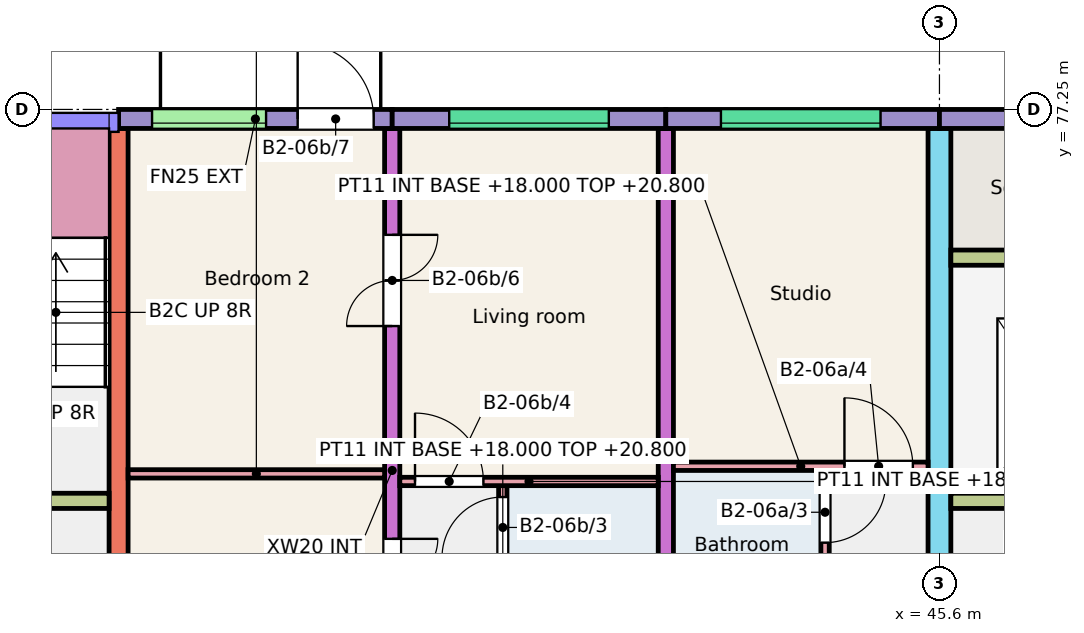
"""IFC4 building model, lengths in metres.
Left out: names, types, materials, properties, quantities, classifications, styles, units other than length and angle.
Written with IfcOpenShell. Run it as: python <this file> out.ifc"""

import sys

from ifc_helpers import new_model, si_unit, direction, frame, frame_2d, origin, place, context, subcontext, project, spatial, rectangle, extrude, element, fill, save


model = new_model("IFC4")
c1 = context("Model", 3, precision=1e-05, world=origin(), true_north=direction((0.0, 1.0)))
c2 = subcontext(c1, "Body", "Model", "MODEL_VIEW")
j1 = project(units=[si_unit("LENGTHUNIT", "METRE"), si_unit("PLANEANGLEUNIT", "RADIAN")], contexts=[c1])
p1 = place(None, origin())
s1 = spatial("IfcSite", under=j1, at=p1, CompositionType="ELEMENT")
p2 = place(p1, origin())
s2 = spatial("IfcBuilding", under=s1, at=p2, CompositionType="ELEMENT")
p3 = place(p2, frame((0.0, 0.0, 18.0)))
s3 = spatial("IfcBuildingStorey", under=s2, at=p3, CompositionType="ELEMENT", Elevation=18.0)
p4 = place(p3, frame((34.8, 68.0, 0.0), z_axis=(0.0, 0.0, 1.0), x_axis=(0.0, 1.0, 0.0)))
e1 = element("IfcWall", 1, at=p4, inside=s3, PredefinedType="SHEAR", context=c2, shape_type="SweptSolid", body=[
    extrude(rectangle(XDim=9.0, YDim=0.25, at=frame_2d((4.5, 0.0))), origin(), (0.0, 0.0, 1.0), 3.0),
])
p5 = place(p3, frame((38.4, 68.0, 0.0), z_axis=(0.0, 0.0, 1.0), x_axis=(0.0, 1.0, 0.0)))
e2 = element("IfcWall", 2, at=p5, inside=s3, PredefinedType="SHEAR", context=c2, shape_type="SweptSolid", body=[
    extrude(rectangle(XDim=9.0, YDim=0.2, at=frame_2d((4.5, 0.0))), origin(), (0.0, 0.0, 1.0), 3.0),
])
p6 = place(p5, frame((2.4, 0.0, 0.0)))
e3 = element("IfcOpeningElement", 3, at=p6, cuts=e2, PredefinedType="OPENING", context=c2, shape_type="SweptSolid", body=[
    extrude(rectangle(XDim=1.2, YDim=2.1, at=frame_2d((0.6, 1.05))), frame((0.0, 0.11, 0.0), z_axis=(0.0, -1.0, 0.0), x_axis=(1.0, 0.0, 0.0)), (0.0, 0.0, 1.0), 0.22),
])
p7 = place(p5, frame((6.4, 0.0, 0.0)))
e4 = element("IfcOpeningElement", 4, at=p7, cuts=e2, PredefinedType="OPENING", context=c2, shape_type="SweptSolid", body=[
    extrude(rectangle(XDim=1.2, YDim=2.1, at=frame_2d((0.6, 1.05))), frame((0.0, 0.11, 0.0), z_axis=(0.0, -1.0, 0.0), x_axis=(1.0, 0.0, 0.0)), (0.0, 0.0, 1.0), 0.22),
])
p8 = place(p3, frame((42.0, 68.0, 0.0), z_axis=(0.0, 0.0, 1.0), x_axis=(0.0, 1.0, 0.0)))
e5 = element("IfcWall", 5, at=p8, inside=s3, PredefinedType="SHEAR", context=c2, shape_type="SweptSolid", body=[
    extrude(rectangle(XDim=9.0, YDim=0.2, at=frame_2d((4.5, 0.0))), origin(), (0.0, 0.0, 1.0), 3.0),
])
p9 = place(p3, frame((45.6, 66.0, 0.0), z_axis=(0.0, 0.0, 1.0), x_axis=(0.0, 1.0, 0.0)))
e6 = element("IfcWall", 6, at=p9, inside=s3, PredefinedType="SHEAR", context=c2, shape_type="SweptSolid", body=[
    extrude(rectangle(XDim=11.0, YDim=0.3, at=frame_2d((5.5, 0.0))), origin(), (0.0, 0.0, 1.0), 3.0),
])
p10 = place(p9, frame((0.3, 0.0, 0.0)))
e7 = element("IfcOpeningElement", 7, at=p10, cuts=e6, PredefinedType="OPENING", context=c2, shape_type="SweptSolid", body=[
    extrude(rectangle(XDim=1.2, YDim=2.1, at=frame_2d((0.6, 1.05))), frame((0.0, 0.16, 0.0), z_axis=(0.0, -1.0, 0.0), x_axis=(1.0, 0.0, 0.0)), (0.0, 0.0, 1.0), 0.32),
])
p11 = place(p3, frame((28.95, 72.1, 0.0), z_axis=(0.0, 0.0, 1.0), x_axis=(1.0, 0.0, 0.0)))
e8 = element("IfcWall", 8, at=p11, inside=s3, PredefinedType="SHEAR", context=c2, shape_type="SweptSolid", body=[
    extrude(rectangle(XDim=5.725, YDim=0.2, at=frame_2d((2.863, 0.0))), origin(), (0.0, 0.0, 1.0), 3.0),
])
p12 = place(p11, frame((3.775, 0.0, 0.0)))
e9 = element("IfcOpeningElement", 9, at=p12, cuts=e8, PredefinedType="OPENING", context=c2, shape_type="SweptSolid", body=[
    extrude(rectangle(XDim=1.0, YDim=2.1, at=frame_2d((0.5, 1.05))), frame((0.0, 0.11, 0.0), z_axis=(0.0, -1.0, 0.0), x_axis=(1.0, 0.0, 0.0)), (0.0, 0.0, 1.0), 0.22),
])
p13 = place(p11, frame((0.762, 0.0, 0.0)))
e10 = element("IfcOpeningElement", 10, at=p13, cuts=e8, PredefinedType="OPENING", context=c2, shape_type="SweptSolid", body=[
    extrude(rectangle(XDim=1.1, YDim=2.1, at=frame_2d((0.55, 1.05))), frame((0.0, 0.11, 0.0), z_axis=(0.0, -1.0, 0.0), x_axis=(1.0, 0.0, 0.0)), (0.0, 0.0, 1.0), 0.22),
])
p14 = place(p3, frame((34.8, 77.125, 0.0), z_axis=(0.0, 0.0, 1.0), x_axis=(1.0, 0.0, 0.0)))
e11 = element("IfcWall", 11, at=p14, inside=s3, PredefinedType="SOLIDWALL", context=c2, shape_type="SweptSolid", body=[
    extrude(rectangle(XDim=3.6, YDim=0.25, at=frame_2d((1.8, 0.0))), origin(), (0.0, 0.0, 1.0), 3.0),
])
p15 = place(p14, frame((0.44, 0.0, 1.2)))
e12 = element("IfcOpeningElement", 12, at=p15, cuts=e11, PredefinedType="OPENING", context=c2, shape_type="SweptSolid", body=[
    extrude(rectangle(XDim=1.5, YDim=1.2, at=frame_2d((0.75, 0.6))), frame((0.0, 0.135, 0.0), z_axis=(0.0, -1.0, 0.0), x_axis=(1.0, 0.0, 0.0)), (0.0, 0.0, 1.0), 0.27),
])
p16 = place(p14, frame((2.356, 0.0, 0.0)))
e13 = element("IfcOpeningElement", 13, at=p16, cuts=e11, PredefinedType="OPENING", context=c2, shape_type="SweptSolid", body=[
    extrude(rectangle(XDim=1.0, YDim=2.1, at=frame_2d((0.5, 1.05))), frame((0.0, 0.135, 0.0), z_axis=(0.0, -1.0, 0.0), x_axis=(1.0, 0.0, 0.0)), (0.0, 0.0, 1.0), 0.27),
])
p17 = place(p3, frame((38.4, 77.125, 0.0), z_axis=(0.0, 0.0, 1.0), x_axis=(1.0, 0.0, 0.0)))
e14 = element("IfcWall", 14, at=p17, inside=s3, PredefinedType="SOLIDWALL", context=c2, shape_type="SweptSolid", body=[
    extrude(rectangle(XDim=3.6, YDim=0.25, at=frame_2d((1.8, 0.0))), origin(), (0.0, 0.0, 1.0), 3.0),
])
p18 = place(p17, frame((0.75, 0.0, 1.2)))
e15 = element("IfcOpeningElement", 15, at=p18, cuts=e14, PredefinedType="OPENING", context=c2, shape_type="SweptSolid", body=[
    extrude(rectangle(XDim=2.1, YDim=1.2, at=frame_2d((1.05, 0.6))), frame((0.0, 0.135, 0.0), z_axis=(0.0, -1.0, 0.0), x_axis=(1.0, 0.0, 0.0)), (0.0, 0.0, 1.0), 0.27),
])
p19 = place(p3, frame((42.0, 77.125, 0.0), z_axis=(0.0, 0.0, 1.0), x_axis=(1.0, 0.0, 0.0)))
e16 = element("IfcWall", 16, at=p19, inside=s3, PredefinedType="SOLIDWALL", context=c2, shape_type="SweptSolid", body=[
    extrude(rectangle(XDim=3.6, YDim=0.25, at=frame_2d((1.8, 0.0))), origin(), (0.0, 0.0, 1.0), 3.0),
])
p20 = place(p19, frame((0.725, 0.0, 1.2)))
e17 = element("IfcOpeningElement", 17, at=p20, cuts=e16, PredefinedType="OPENING", context=c2, shape_type="SweptSolid", body=[
    extrude(rectangle(XDim=2.1, YDim=1.2, at=frame_2d((1.05, 0.6))), frame((0.0, 0.135, 0.0), z_axis=(0.0, -1.0, 0.0), x_axis=(1.0, 0.0, 0.0)), (0.0, 0.0, 1.0), 0.27),
])
p21 = place(p3, frame((45.6, 77.125, 0.0), z_axis=(0.0, 0.0, 1.0), x_axis=(1.0, 0.0, 0.0)))
e18 = element("IfcWall", 18, at=p21, inside=s3, PredefinedType="SOLIDWALL", context=c2, shape_type="SweptSolid", body=[
    extrude(rectangle(XDim=2.975, YDim=0.25, at=frame_2d((1.487, 0.0))), origin(), (0.0, 0.0, 1.0), 3.0),
])
p22 = place(p3, frame((45.75, 72.1, 0.0), z_axis=(0.0, 0.0, 1.0), x_axis=(1.0, 0.0, 0.0)))
e19 = element("IfcWall", 19, at=p22, inside=s3, PredefinedType="SHEAR", context=c2, shape_type="SweptSolid", body=[
    extrude(rectangle(XDim=5.725, YDim=0.2, at=frame_2d((2.863, 0.0))), origin(), (0.0, 0.0, 1.0), 3.0),
])
p23 = place(p22, frame((3.775, 0.0, 0.0)))
e20 = element("IfcOpeningElement", 20, at=p23, cuts=e19, PredefinedType="OPENING", context=c2, shape_type="SweptSolid", body=[
    extrude(rectangle(XDim=1.0, YDim=2.1, at=frame_2d((0.5, 1.05))), frame((0.0, 0.11, 0.0), z_axis=(0.0, -1.0, 0.0), x_axis=(1.0, 0.0, 0.0)), (0.0, 0.0, 1.0), 0.22),
])
p24 = place(p22, frame((0.762, 0.0, 0.0)))
e21 = element("IfcOpeningElement", 21, at=p24, cuts=e19, PredefinedType="OPENING", context=c2, shape_type="SweptSolid", body=[
    extrude(rectangle(XDim=1.1, YDim=2.1, at=frame_2d((0.55, 1.05))), frame((0.0, 0.11, 0.0), z_axis=(0.0, -1.0, 0.0), x_axis=(1.0, 0.0, 0.0)), (0.0, 0.0, 1.0), 0.22),
])
p25 = place(p3, frame((45.75, 75.3, 0.0), z_axis=(0.0, 0.0, 1.0), x_axis=(1.0, 0.0, 0.0)))
e22 = element("IfcWall", 22, at=p25, inside=s3, PredefinedType="SHEAR", context=c2, shape_type="SweptSolid", body=[
    extrude(rectangle(XDim=2.625, YDim=0.2, at=frame_2d((1.312, 0.0))), origin(), (0.0, 0.0, 1.0), 3.0),
])
p26 = place(p3, frame((44.095, 68.0, 0.0), z_axis=(0.0, 0.0, 1.0), x_axis=(0.0, 1.0, 0.0)))
e23 = element("IfcWall", 23, at=p26, inside=s3, PredefinedType="PARTITIONING", context=c2, shape_type="SweptSolid", body=[
    extrude(rectangle(XDim=4.5, YDim=0.11, at=frame_2d((2.25, 0.0))), origin(), (0.0, 0.0, 1.0), 2.8),
])
p27 = place(p26, frame((0.2, 0.0, 0.0)))
e24 = element("IfcOpeningElement", 24, at=p27, cuts=e23, PredefinedType="OPENING", context=c2, shape_type="SweptSolid", body=[
    extrude(rectangle(XDim=0.8, YDim=2.1, at=frame_2d((0.4, 1.05))), frame((0.0, 0.065, 0.0), z_axis=(0.0, -1.0, 0.0), x_axis=(1.0, 0.0, 0.0)), (0.0, 0.0, 1.0), 0.13),
])
p28 = place(p26, frame((3.55, 0.0, 0.0)))
e25 = element("IfcOpeningElement", 25, at=p28, cuts=e23, PredefinedType="OPENING", context=c2, shape_type="SweptSolid", body=[
    extrude(rectangle(XDim=0.8, YDim=2.1, at=frame_2d((0.4, 1.05))), frame((0.0, 0.065, 0.0), z_axis=(0.0, -1.0, 0.0), x_axis=(1.0, 0.0, 0.0)), (0.0, 0.0, 1.0), 0.13),
])
p29 = place(p3, frame((42.1, 72.555, 0.0), z_axis=(0.0, 0.0, 1.0), x_axis=(1.0, 0.0, 0.0)))
e26 = element("IfcWall", 26, at=p29, inside=s3, PredefinedType="PARTITIONING", context=c2, shape_type="SweptSolid", body=[
    extrude(rectangle(XDim=3.35, YDim=0.11, at=frame_2d((1.675, 0.0))), origin(), (0.0, 0.0, 1.0), 2.8),
])
p30 = place(p29, frame((2.25, 0.0, 0.0)))
e27 = element("IfcOpeningElement", 27, at=p30, cuts=e26, PredefinedType="OPENING", context=c2, shape_type="SweptSolid", body=[
    extrude(rectangle(XDim=0.9, YDim=2.1, at=frame_2d((0.45, 1.05))), frame((0.0, 0.065, 0.0), z_axis=(0.0, -1.0, 0.0), x_axis=(1.0, 0.0, 0.0)), (0.0, 0.0, 1.0), 0.13),
])
p31 = place(p3, frame((39.855, 68.0, 0.0), z_axis=(0.0, 0.0, 1.0), x_axis=(0.0, 1.0, 0.0)))
e28 = element("IfcWall", 28, at=p31, inside=s3, PredefinedType="PARTITIONING", context=c2, shape_type="SweptSolid", body=[
    extrude(rectangle(XDim=4.3, YDim=0.11, at=frame_2d((2.15, 0.0))), origin(), (0.0, 0.0, 1.0), 2.8),
])
p32 = place(p31, frame((0.2, 0.0, 0.0)))
e29 = element("IfcOpeningElement", 29, at=p32, cuts=e28, PredefinedType="OPENING", context=c2, shape_type="SweptSolid", body=[
    extrude(rectangle(XDim=0.8, YDim=2.1, at=frame_2d((0.4, 1.05))), frame((0.0, 0.065, 0.0), z_axis=(0.0, -1.0, 0.0), x_axis=(1.0, 0.0, 0.0)), (0.0, 0.0, 1.0), 0.13),
])
p33 = place(p31, frame((3.35, 0.0, 0.0)))
e30 = element("IfcOpeningElement", 30, at=p33, cuts=e28, PredefinedType="OPENING", context=c2, shape_type="SweptSolid", body=[
    extrude(rectangle(XDim=0.8, YDim=2.1, at=frame_2d((0.4, 1.05))), frame((0.0, 0.065, 0.0), z_axis=(0.0, -1.0, 0.0), x_axis=(1.0, 0.0, 0.0)), (0.0, 0.0, 1.0), 0.13),
])
p34 = place(p3, frame((38.5, 72.355, 0.0), z_axis=(0.0, 0.0, 1.0), x_axis=(1.0, 0.0, 0.0)))
e31 = element("IfcWall", 31, at=p34, inside=s3, PredefinedType="PARTITIONING", context=c2, shape_type="SweptSolid", body=[
    extrude(rectangle(XDim=3.4, YDim=0.11, at=frame_2d((1.7, 0.0))), origin(), (0.0, 0.0, 1.0), 2.8),
])
p35 = place(p34, frame((0.2, 0.0, 0.0)))
e32 = element("IfcOpeningElement", 32, at=p35, cuts=e31, PredefinedType="OPENING", context=c2, shape_type="SweptSolid", body=[
    extrude(rectangle(XDim=0.9, YDim=2.1, at=frame_2d((0.45, 1.05))), frame((0.0, 0.065, 0.0), z_axis=(0.0, -1.0, 0.0), x_axis=(1.0, 0.0, 0.0)), (0.0, 0.0, 1.0), 0.13),
])
p36 = place(p3, frame((34.925, 72.455, 0.0), z_axis=(0.0, 0.0, 1.0), x_axis=(1.0, 0.0, 0.0)))
e33 = element("IfcWall", 33, at=p36, inside=s3, PredefinedType="PARTITIONING", context=c2, shape_type="SweptSolid", body=[
    extrude(rectangle(XDim=3.375, YDim=0.11, at=frame_2d((1.688, 0.0))), origin(), (0.0, 0.0, 1.0), 2.8),
])
p37 = place(p20, origin())
e34 = element("IfcWindow", 34, at=p37, inside=s3, PartitioningType="SINGLE_PANEL", PredefinedType="WINDOW", context=c2, shape_type="SweptSolid", body=[
    extrude(rectangle(XDim=2.1, YDim=1.2, at=frame_2d((1.05, 0.6))), frame((0.0, -0.025, 0.0), z_axis=(0.0, -1.0, 0.0), x_axis=(1.0, 0.0, 0.0)), (0.0, 0.0, 1.0), 0.06),
])
fill(e17, e34)
p38 = place(p15, origin())
e35 = element("IfcWindow", 35, at=p38, inside=s3, PartitioningType="SINGLE_PANEL", PredefinedType="WINDOW", context=c2, shape_type="SweptSolid", body=[
    extrude(rectangle(XDim=1.5, YDim=1.2, at=frame_2d((0.75, 0.6))), frame((0.0, -0.025, 0.0), z_axis=(0.0, -1.0, 0.0), x_axis=(1.0, 0.0, 0.0)), (0.0, 0.0, 1.0), 0.06),
])
fill(e12, e35)
p39 = place(p18, origin())
e36 = element("IfcWindow", 36, at=p39, inside=s3, PartitioningType="SINGLE_PANEL", PredefinedType="WINDOW", context=c2, shape_type="SweptSolid", body=[
    extrude(rectangle(XDim=2.1, YDim=1.2, at=frame_2d((1.05, 0.6))), frame((0.0, -0.025, 0.0), z_axis=(0.0, -1.0, 0.0), x_axis=(1.0, 0.0, 0.0)), (0.0, 0.0, 1.0), 0.06),
])
fill(e15, e36)
p40 = place(p28, origin())
e37 = element("IfcDoor", 37, at=p40, inside=s3, OperationType="SINGLE_SWING_RIGHT", PredefinedType="DOOR", context=c2, shape_type="SweptSolid", body=[
    extrude(rectangle(XDim=0.8, YDim=2.1, at=frame_2d((0.4, 1.05))), frame((0.0, 0.025, 0.0), z_axis=(0.0, -1.0, 0.0), x_axis=(1.0, 0.0, 0.0)), (0.0, 0.0, 1.0), 0.05),
])
fill(e25, e37)
p41 = place(p30, origin())
e38 = element("IfcDoor", 38, at=p41, inside=s3, OperationType="SINGLE_SWING_LEFT", PredefinedType="DOOR", context=c2, shape_type="SweptSolid", body=[
    extrude(rectangle(XDim=0.9, YDim=2.1, at=frame_2d((0.45, 1.05))), frame((0.0, 0.025, 0.0), z_axis=(0.0, -1.0, 0.0), x_axis=(1.0, 0.0, 0.0)), (0.0, 0.0, 1.0), 0.05),
])
fill(e27, e38)
p42 = place(p33, origin())
e39 = element("IfcDoor", 39, at=p42, inside=s3, OperationType="SINGLE_SWING_LEFT", PredefinedType="DOOR", context=c2, shape_type="SweptSolid", body=[
    extrude(rectangle(XDim=0.8, YDim=2.1, at=frame_2d((0.4, 1.05))), frame((0.0, 0.025, 0.0), z_axis=(0.0, -1.0, 0.0), x_axis=(1.0, 0.0, 0.0)), (0.0, 0.0, 1.0), 0.05),
])
fill(e30, e39)
p43 = place(p35, origin())
e40 = element("IfcDoor", 40, at=p43, inside=s3, OperationType="SINGLE_SWING_LEFT", PredefinedType="DOOR", context=c2, shape_type="SweptSolid", body=[
    extrude(rectangle(XDim=0.9, YDim=2.1, at=frame_2d((0.45, 1.05))), frame((0.0, 0.025, 0.0), z_axis=(0.0, -1.0, 0.0), x_axis=(1.0, 0.0, 0.0)), (0.0, 0.0, 1.0), 0.05),
])
fill(e32, e40)
p44 = place(p6, origin())
e41 = element("IfcDoor", 41, at=p44, inside=s3, OperationType="DOUBLE_DOOR_SINGLE_SWING", PredefinedType="DOOR", context=c2, shape_type="SweptSolid", body=[
    extrude(rectangle(XDim=1.2, YDim=2.1, at=frame_2d((0.6, 1.05))), frame((0.0, 0.025, 0.0), z_axis=(0.0, -1.0, 0.0), x_axis=(1.0, 0.0, 0.0)), (0.0, 0.0, 1.0), 0.05),
])
fill(e3, e41)
p45 = place(p7, origin())
e42 = element("IfcDoor", 42, at=p45, inside=s3, OperationType="DOUBLE_DOOR_SINGLE_SWING", PredefinedType="DOOR", context=c2, shape_type="SweptSolid", body=[
    extrude(rectangle(XDim=1.2, YDim=2.1, at=frame_2d((0.6, 1.05))), frame((0.0, 0.025, 0.0), z_axis=(0.0, -1.0, 0.0), x_axis=(1.0, 0.0, 0.0)), (0.0, 0.0, 1.0), 0.05),
])
fill(e4, e42)
p46 = place(p16, origin())
e43 = element("IfcDoor", 43, at=p46, inside=s3, OperationType="SINGLE_SWING_LEFT", PredefinedType="DOOR", context=c2, shape_type="SweptSolid", body=[
    extrude(rectangle(XDim=1.0, YDim=2.1, at=frame_2d((0.5, 1.05))), frame((0.0, 0.025, 0.0), z_axis=(0.0, -1.0, 0.0), x_axis=(1.0, 0.0, 0.0)), (0.0, 0.0, 1.0), 0.05),
])
fill(e13, e43)
save(model, sys.argv[1])
